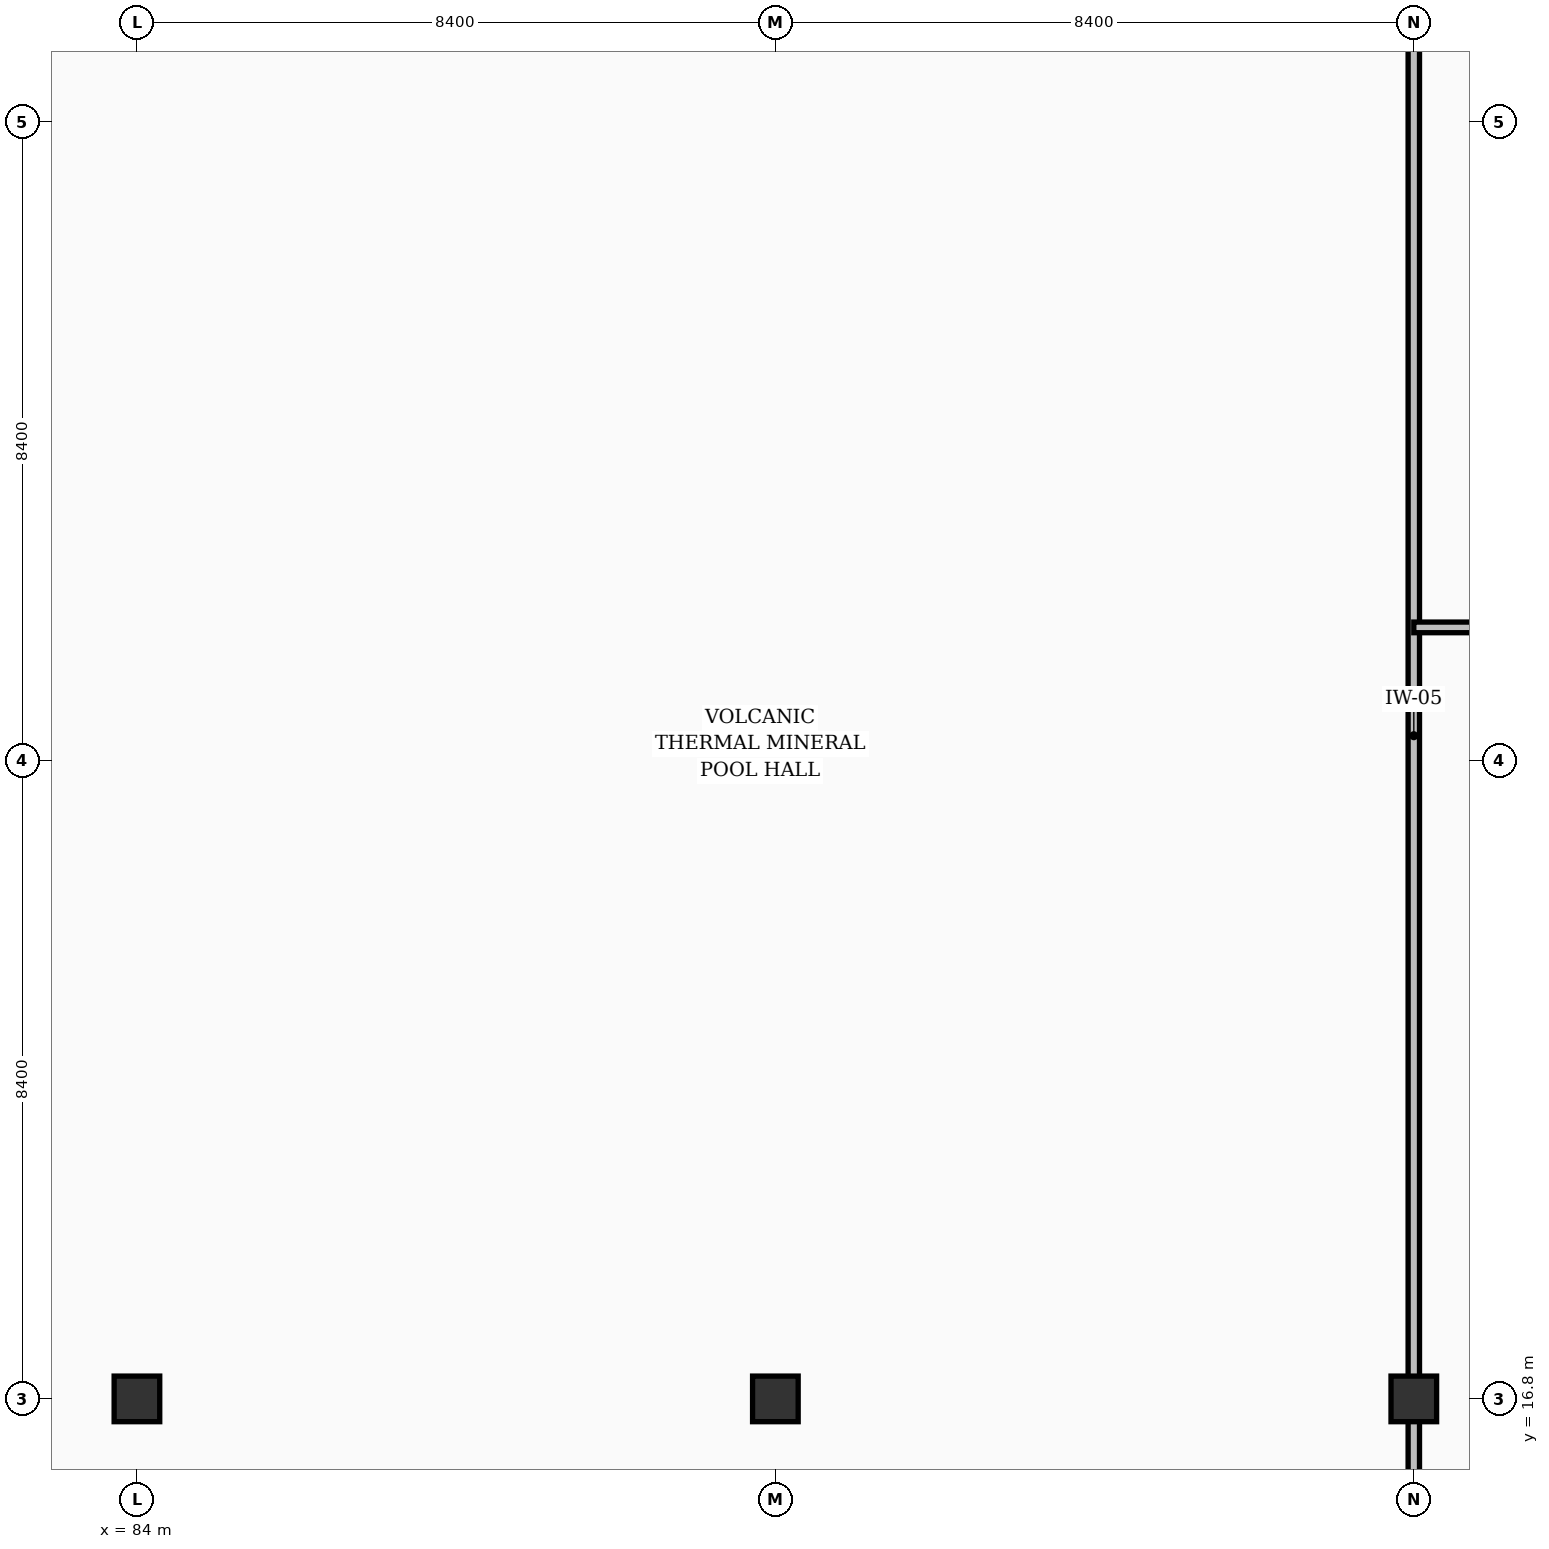
"""IFC4 building model, lengths in metres.
Left out: names, types, materials, properties, quantities, classifications, styles, units other than length and angle.
Written with IfcOpenShell. Run it as: python <this file> out.ifc"""

import sys

from ifc_helpers import new_model, si_unit, direction, frame, frame_2d, origin, origin_2d, place, context, subcontext, project, spatial, rectangle, extrude, element, save


model = new_model("IFC4")
c1 = context("Model", 3, precision=1e-05, world=origin(), true_north=direction((0.0, 1.0)))
c2 = subcontext(c1, "Body", "Model", "MODEL_VIEW")
j1 = project(units=[si_unit("LENGTHUNIT", "METRE"), si_unit("PLANEANGLEUNIT", "RADIAN")], contexts=[c1])
p1 = place(None, origin())
s1 = spatial("IfcSite", under=j1, at=p1, CompositionType="ELEMENT")
p2 = place(p1, origin())
s2 = spatial("IfcBuilding", under=s1, at=p2, CompositionType="ELEMENT")
p3 = place(p2, origin())
s3 = spatial("IfcBuildingStorey", under=s2, at=p3, CompositionType="ELEMENT", Elevation=0.0)
for number, where, z_axis, x_axis in (
    (1, (84.0, 16.8, 0.0), (0.0, 0.0, 1.0), (1.0, 0.0, 0.0)),
    (2, (92.4, 16.8, 0.0), (0.0, 0.0, 1.0), (1.0, 0.0, 0.0)),
    (3, (100.8, 16.8, 0.0), (0.0, 0.0, 1.0), (1.0, 0.0, 0.0)),
):
    element("IfcColumn", number, at=place(p3, frame(where, z_axis=z_axis, x_axis=x_axis)), inside=s3, PredefinedType="COLUMN", context=c2, shape_type="SweptSolid", body=[
        extrude(rectangle(XDim=0.6, YDim=0.6, at=origin_2d()), origin(), (0.0, 0.0, 1.0), 3.92),
    ])
p4 = place(p3, frame((100.8, 8.8, 0.0), z_axis=(0.0, 0.0, 1.0), x_axis=(0.0, 1.0, 0.0)))
e4 = element("IfcWall", 4, at=p4, inside=s3, PredefinedType="PARTITIONING", context=c2, shape_type="SweptSolid", body=[
    extrude(rectangle(XDim=36.4, YDim=0.15, at=frame_2d((18.2, 0.0))), origin(), (0.0, 0.0, 1.0), 2.675),
])
p5 = place(p4, frame((3.6, 0.0, 0.0)))
e5 = element("IfcOpeningElement", 5, at=p5, cuts=e4, PredefinedType="OPENING", context=c2, shape_type="SweptSolid", body=[
    extrude(rectangle(XDim=1.05, YDim=2.15, at=frame_2d((0.525, 1.075))), frame((0.0, 0.085, 0.0), z_axis=(0.0, -1.0, 0.0), x_axis=(1.0, 0.0, 0.0)), (0.0, 0.0, 1.0), 0.17),
])
p6 = place(p4, frame((28.8, 0.0, 0.0)))
e6 = element("IfcOpeningElement", 6, at=p6, cuts=e4, PredefinedType="OPENING", context=c2, shape_type="SweptSolid", body=[
    extrude(rectangle(XDim=1.05, YDim=2.15, at=frame_2d((0.525, 1.075))), frame((0.0, 0.085, 0.0), z_axis=(0.0, -1.0, 0.0), x_axis=(1.0, 0.0, 0.0)), (0.0, 0.0, 1.0), 0.17),
])
p7 = place(p3, frame((100.8, 26.95, 0.0), z_axis=(0.0, 0.0, 1.0), x_axis=(1.0, 0.0, 0.0)))
e7 = element("IfcWall", 7, at=p7, inside=s3, PredefinedType="PARTITIONING", context=c2, shape_type="SweptSolid", body=[
    extrude(rectangle(XDim=8.225, YDim=0.14, at=frame_2d((4.112, 0.0))), origin(), (0.0, 0.0, 1.0), 3.64),
])
save(model, sys.argv[1])
